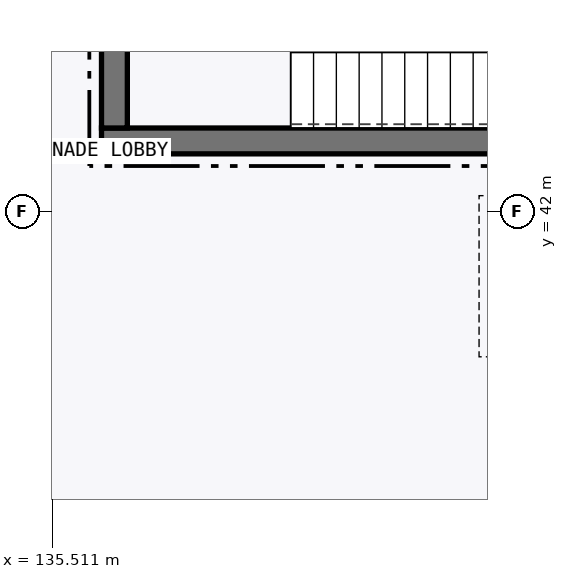
"""IFC4 building model, lengths in metres.
Left out: names, types, materials, properties, quantities, classifications, styles, units other than length and angle.
Written with IfcOpenShell. Run it as: python <this file> out.ifc"""

import sys

from ifc_helpers import new_model, si_unit, direction, frame, frame_2d, origin, place, context, subcontext, project, spatial, rectangle, extrude, element, save


model = new_model("IFC4")
c1 = context("Model", 3, precision=1e-05, world=origin(), true_north=direction((0.0, 1.0)))
c2 = subcontext(c1, "Body", "Model", "MODEL_VIEW")
j1 = project(units=[si_unit("LENGTHUNIT", "METRE"), si_unit("PLANEANGLEUNIT", "RADIAN")], contexts=[c1])
p1 = place(None, origin())
s1 = spatial("IfcSite", under=j1, at=p1, CompositionType="ELEMENT")
p2 = place(p1, origin())
s2 = spatial("IfcBuilding", under=s1, at=p2, CompositionType="ELEMENT")
p3 = place(p2, frame((0.0, 0.0, 16.5)))
s3 = spatial("IfcBuildingStorey", under=s2, at=p3, CompositionType="ELEMENT", Elevation=16.5)
p4 = place(p3, frame((136.16, 42.93, 0.0), z_axis=(0.0, 0.0, 1.0), x_axis=(1.0, 0.0, 0.0)))
e1 = element("IfcWall", 1, at=p4, inside=s3, PredefinedType="SHEAR", context=c2, shape_type="SweptSolid", body=[
    extrude(rectangle(XDim=10.88, YDim=0.34, at=frame_2d((5.44, 0.0))), origin(), (0.0, 0.0, 1.0), 4.845),
])
p5 = place(p3, frame((136.33, 47.3, 0.0), z_axis=(0.0, 0.0, 1.0), x_axis=(0.0, -1.0, 0.0)))
e2 = element("IfcWall", 2, at=p5, inside=s3, PredefinedType="SHEAR", context=c2, shape_type="SweptSolid", body=[
    extrude(rectangle(XDim=4.2, YDim=0.34, at=frame_2d((2.1, 0.0))), origin(), (0.0, 0.0, 1.0), 4.845),
])
p6 = place(p5, frame((1.35, 0.0, 0.0)))
e3 = element("IfcOpeningElement", 3, at=p6, cuts=e2, PredefinedType="OPENING", context=c2, shape_type="SweptSolid", body=[
    extrude(rectangle(XDim=1.5, YDim=2.15, at=frame_2d((0.75, 1.075))), frame((0.0, 0.18, 0.0), z_axis=(0.0, -1.0, 0.0), x_axis=(1.0, 0.0, 0.0)), (0.0, 0.0, 1.0), 0.36),
])
save(model, sys.argv[1])
